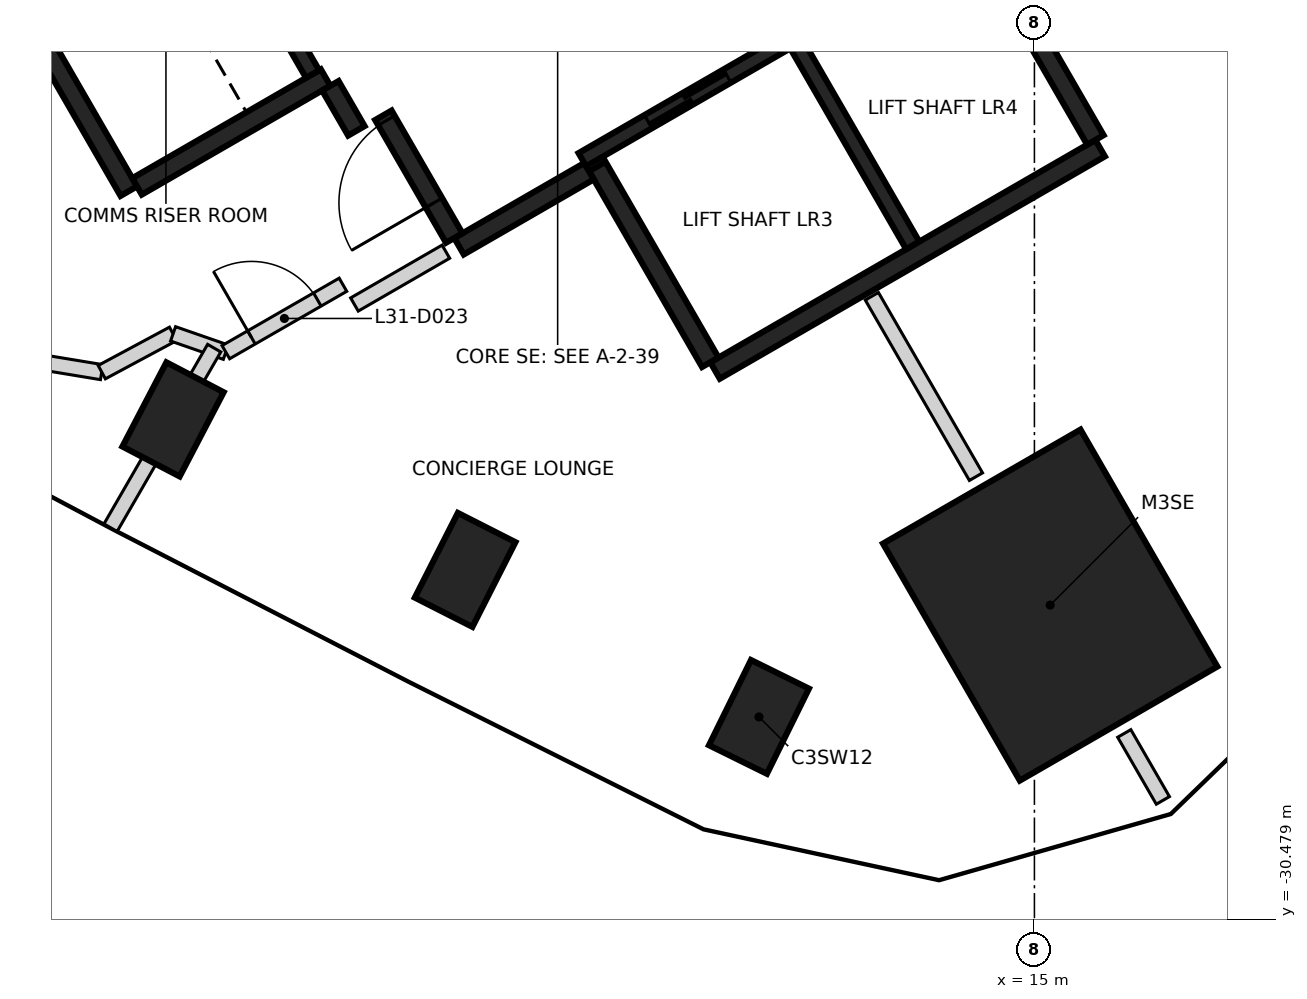
"""IFC4 building model, lengths in metres.
Left out: names, types, materials, properties, quantities, classifications, styles, units other than length and angle.
Written with IfcOpenShell. Run it as: python <this file> out.ifc"""

import sys

from ifc_helpers import new_model, si_unit, direction, frame, frame_2d, origin, origin_2d, place, context, subcontext, project, spatial, rectangle, extrude, element, fill, save


model = new_model("IFC4")
c1 = context("Model", 3, precision=1e-05, world=origin(), true_north=direction((0.0, 1.0)))
c2 = subcontext(c1, "Body", "Model", "MODEL_VIEW")
j1 = project(units=[si_unit("LENGTHUNIT", "METRE"), si_unit("PLANEANGLEUNIT", "RADIAN")], contexts=[c1])
p1 = place(None, origin())
s1 = spatial("IfcSite", under=j1, at=p1, CompositionType="ELEMENT")
p2 = place(p1, origin())
s2 = spatial("IfcBuilding", under=s1, at=p2, CompositionType="ELEMENT")
p3 = place(p2, frame((0.0, 0.0, 128.8)))
s3 = spatial("IfcBuildingStorey", under=s2, at=p3, CompositionType="ELEMENT", Elevation=128.8)
for number, where, z_axis, x_axis in (
    (1, (3.667, -23.896, -0.4), (0.0, 0.0, 1.0), (0.463, 0.886, 0.0)),
    (2, (7.51, -25.876, -0.4), (0.0, 0.0, 1.0), (0.453, 0.892, 0.0)),
    (3, (11.376, -27.811, -0.4), (0.0, 0.0, 1.0), (0.442, 0.897, 0.0)),
):
    element("IfcColumn", number, at=place(p3, frame(where, z_axis=z_axis, x_axis=x_axis)), inside=s3, PredefinedType="COLUMN", context=c2, shape_type="SweptSolid", body=[
        extrude(rectangle(XDim=1.25, YDim=0.85, at=origin_2d()), origin(), (0.0, 0.0, 1.0), 3.6),
    ])
p4 = place(p3, frame((15.207, -26.34, -0.4), z_axis=(0.0, 0.0, 1.0), x_axis=(-0.5, 0.866025403784, 0.0)))
e4 = element("IfcColumn", 4, at=p4, inside=s3, PredefinedType="COLUMN", context=c2, shape_type="SweptSolid", body=[
    extrude(rectangle(XDim=3.6, YDim=3.0, at=origin_2d()), origin(), (0.0, 0.0, 1.0), 3.6),
])
p5 = place(p3, frame((15.865, -20.328, 0.0), z_axis=(0.0, 0.0, 1.0), x_axis=(-0.86602852612, -0.499994591916, 0.0)))
e5 = element("IfcWall", 5, at=p5, inside=s3, PredefinedType="SHEAR", context=c2, shape_type="SweptSolid", body=[
    extrude(rectangle(XDim=5.85, YDim=0.25, at=frame_2d((2.925, 0.0))), origin(), (0.0, 0.0, 1.0), 3.2),
])
for number, where, z_axis, x_axis in (
    (6, (14.315, -17.644, 0.0), (0.0, 0.0, 1.0), (0.5, -0.866, 0.0)),
    (7, (10.736, -23.145, 0.0), (0.0, 0.0, 1.0), (-0.5, 0.866, 0.0)),
):
    element("IfcWall", number, at=place(p3, frame(where, z_axis=z_axis, x_axis=x_axis)), inside=s3, PredefinedType="SHEAR", context=c2, shape_type="SweptSolid", body=[
        extrude(rectangle(XDim=2.974, YDim=0.25, at=frame_2d((1.487, 0.0))), origin(), (0.0, 0.0, 1.0), 3.2),
    ])
p6 = place(p3, frame((3.085, -20.894, 0.0), z_axis=(0.0, 0.0, 1.0), x_axis=(-0.499978833458, 0.866037623948, 0.0)))
e8 = element("IfcWall", 8, at=p6, inside=s3, PredefinedType="SHEAR", context=c2, shape_type="SweptSolid", body=[
    extrude(rectangle(XDim=3.05, YDim=0.25, at=frame_2d((1.525, 0.0))), origin(), (0.0, 0.0, 1.0), 3.2),
])
p7 = place(p3, frame((5.675, -19.399, 0.0), z_axis=(0.0, 0.0, 1.0), x_axis=(-0.866026637627, -0.499997862916, 0.0)))
e9 = element("IfcWall", 9, at=p7, inside=s3, PredefinedType="SHEAR", context=c2, shape_type="SweptSolid", body=[
    extrude(rectangle(XDim=2.865, YDim=0.25, at=frame_2d((1.432, 0.0))), origin(), (0.0, 0.0, 1.0), 3.2),
])
p8 = place(p3, frame((9.14, -20.631, 0.0), z_axis=(0.0, 0.0, 1.0), x_axis=(-0.866043531843, -0.499968599967, 0.0)))
e10 = element("IfcWall", 10, at=p8, inside=s3, PredefinedType="SHEAR", context=c2, shape_type="SweptSolid", body=[
    extrude(rectangle(XDim=1.975, YDim=0.25, at=frame_2d((0.987, 0.0))), origin(), (0.0, 0.0, 1.0), 3.2),
])
p9 = place(p3, frame((7.367, -21.51, 0.0), z_axis=(0.0, 0.0, 1.0), x_axis=(-0.499983108224, 0.866035156036, 0.0)))
e11 = element("IfcWall", 11, at=p9, inside=s3, PredefinedType="SHEAR", context=c2, shape_type="SweptSolid", body=[
    extrude(rectangle(XDim=1.865, YDim=0.25, at=frame_2d((0.932, 0.0))), origin(), (0.0, 0.0, 1.0), 3.2),
])
p10 = place(p9, frame((0.535, 0.0, 0.0)))
e12 = element("IfcOpeningElement", 12, at=p10, cuts=e11, PredefinedType="OPENING", context=c2, shape_type="SweptSolid", body=[
    extrude(rectangle(XDim=1.25, YDim=2.1, at=frame_2d((0.625, 1.05))), frame((0.0, 0.135, 0.0), z_axis=(0.0, -1.0, 0.0), x_axis=(1.0, 0.0, 0.0)), (0.0, 0.0, 1.0), 0.27),
])
p11 = place(p3, frame((6.08, -20.1, 0.0), z_axis=(0.0, 0.0, 1.0), x_axis=(-0.500051773299, 0.865995510393, 0.0)))
e13 = element("IfcWall", 13, at=p11, inside=s3, PredefinedType="SHEAR", context=c2, shape_type="SweptSolid", body=[
    extrude(rectangle(XDim=0.685, YDim=0.25, at=frame_2d((0.342, 0.0))), origin(), (0.0, 0.0, 1.0), 3.2),
])
p12 = place(p3, frame((9.052, -20.48, 0.0), z_axis=(0.0, 0.0, 1.0), x_axis=(0.866030299012, 0.499991521122, 0.0)))
e14 = element("IfcWall", 14, at=p12, inside=s3, PredefinedType="SHEAR", context=c2, shape_type="SweptSolid", body=[
    extrude(rectangle(XDim=6.1, YDim=0.2, at=frame_2d((3.05, 0.0))), origin(), (0.0, 0.0, 1.0), 3.2),
])
p13 = place(p12, frame((1.0, 0.0, 0.0)))
e15 = element("IfcOpeningElement", 15, at=p13, cuts=e14, PredefinedType="OPENING", context=c2, shape_type="SweptSolid", body=[
    extrude(rectangle(XDim=1.2, YDim=2.1, at=frame_2d((0.6, 1.05))), frame((0.0, 0.11, 0.0), z_axis=(0.0, -1.0, 0.0), x_axis=(1.0, 0.0, 0.0)), (0.0, 0.0, 1.0), 0.22),
])
p14 = place(p12, frame((4.05, 0.0, 0.0)))
e16 = element("IfcOpeningElement", 16, at=p14, cuts=e14, PredefinedType="OPENING", context=c2, shape_type="SweptSolid", body=[
    extrude(rectangle(XDim=1.2, YDim=2.1, at=frame_2d((0.6, 1.05))), frame((0.0, 0.11, 0.0), z_axis=(0.0, -1.0, 0.0), x_axis=(1.0, 0.0, 0.0)), (0.0, 0.0, 1.0), 0.22),
])
p15 = place(p3, frame((11.875, -18.967, 0.0), z_axis=(0.0, 0.0, 1.0), x_axis=(0.49998131003, -0.866036194175, 0.0)))
e17 = element("IfcWall", 17, at=p15, inside=s3, PredefinedType="SHEAR", context=c2, shape_type="SweptSolid", body=[
    extrude(rectangle(XDim=3.048, YDim=0.2, at=frame_2d((1.524, 0.0))), origin(), (0.0, 0.0, 1.0), 3.2),
])
p16 = place(p3, frame((5.503, -19.352, 0.0), z_axis=(0.0, 0.0, 1.0), x_axis=(-0.499986818241, 0.866033014143, 0.0)))
e18 = element("IfcWall", 18, at=p16, inside=s3, PredefinedType="SHEAR", context=c2, shape_type="SweptSolid", body=[
    extrude(rectangle(XDim=2.798, YDim=0.2, at=frame_2d((1.399, 0.0))), origin(), (0.0, 0.0, 1.0), 3.2),
])
p17 = place(p16, frame((0.949, 0.0, 0.0)))
e19 = element("IfcOpeningElement", 19, at=p17, cuts=e18, PredefinedType="OPENING", context=c2, shape_type="SweptSolid", body=[
    extrude(rectangle(XDim=0.9, YDim=2.1, at=frame_2d((0.45, 1.05))), frame((0.0, 0.11, 0.0), z_axis=(0.0, -1.0, 0.0), x_axis=(1.0, 0.0, 0.0)), (0.0, 0.0, 1.0), 0.22),
])
p18 = place(p3, frame((1.584, -23.086, 0.0), z_axis=(0.0, 0.0, 1.0), x_axis=(0.986654221629, -0.162829502674, 0.0)))
e20 = element("IfcWall", 20, at=p18, inside=s3, PredefinedType="PARTITIONING", context=c2, shape_type="SweptSolid", body=[
    extrude(rectangle(XDim=1.16, YDim=0.2, at=frame_2d((0.58, 0.0))), origin(), (0.0, 0.0, 1.0), 2.3),
])
p19 = place(p3, frame((2.73, -23.275, 0.0), z_axis=(0.0, 0.0, 1.0), x_axis=(0.880927165636, 0.473251866182, 0.0)))
e21 = element("IfcWall", 21, at=p19, inside=s3, PredefinedType="PARTITIONING", context=c2, shape_type="SweptSolid", body=[
    extrude(rectangle(XDim=1.065, YDim=0.2, at=frame_2d((0.532, 0.0))), origin(), (0.0, 0.0, 1.0), 3.2),
])
p20 = place(p3, frame((3.668, -22.771, 0.0), z_axis=(0.0, 0.0, 1.0), x_axis=(0.944447470761, -0.328662402738, 0.0)))
e22 = element("IfcWall", 22, at=p20, inside=s3, PredefinedType="PARTITIONING", context=c2, shape_type="SweptSolid", body=[
    extrude(rectangle(XDim=0.735, YDim=0.2, at=frame_2d((0.367, 0.0))), origin(), (0.0, 0.0, 1.0), 3.2),
])
p21 = place(p3, frame((4.362, -23.012, 0.0), z_axis=(0.0, 0.0, 1.0), x_axis=(0.866692617793, 0.49884256661, 0.0)))
e23 = element("IfcWall", 23, at=p21, inside=s3, PredefinedType="PARTITIONING", context=c2, shape_type="SweptSolid", body=[
    extrude(rectangle(XDim=1.778, YDim=0.2, at=frame_2d((0.889, 0.0))), origin(), (0.0, 0.0, 1.0), 3.2),
])
p22 = place(p21, frame((0.389, 0.0, 0.0)))
e24 = element("IfcOpeningElement", 24, at=p22, cuts=e23, PredefinedType="OPENING", context=c2, shape_type="SweptSolid", body=[
    extrude(rectangle(XDim=1.0, YDim=2.1, at=frame_2d((0.5, 1.05))), frame((0.0, 0.11, 0.0), z_axis=(0.0, -1.0, 0.0), x_axis=(1.0, 0.0, 0.0)), (0.0, 0.0, 1.0), 0.22),
])
p23 = place(p3, frame((6.054, -22.385, 0.0), z_axis=(0.0, 0.0, 1.0), x_axis=(0.86593101922, 0.500163443238, 0.0)))
e25 = element("IfcWall", 25, at=p23, inside=s3, PredefinedType="PARTITIONING", context=c2, shape_type="SweptSolid", body=[
    extrude(rectangle(XDim=1.39, YDim=0.2, at=frame_2d((0.695, 0.0))), origin(), (0.0, 0.0, 1.0), 3.2),
])
p24 = place(p3, frame((2.845, -25.321, 0.0), z_axis=(0.0, 0.0, 1.0), x_axis=(0.499942002849, 0.866058885866, 0.0)))
e26 = element("IfcWall", 26, at=p24, inside=s3, PredefinedType="PARTITIONING", context=c2, shape_type="SweptSolid", body=[
    extrude(rectangle(XDim=2.727, YDim=0.2, at=frame_2d((1.364, 0.0))), origin(), (0.0, 0.0, 1.0), 3.2),
])
p25 = place(p3, frame((12.861, -22.276, 0.0), z_axis=(0.0, 0.0, 1.0), x_axis=(0.49982784299, -0.866124775868, 0.0)))
e27 = element("IfcWall", 27, at=p25, inside=s3, PredefinedType="PARTITIONING", context=c2, shape_type="SweptSolid", body=[
    extrude(rectangle(XDim=2.741, YDim=0.2, at=frame_2d((1.37, 0.0))), origin(), (0.0, 0.0, 1.0), 3.2),
])
p26 = place(p3, frame((16.182, -28.028, 0.0), z_axis=(0.0, 0.0, 1.0), x_axis=(0.499625455419, -0.866241539236, 0.0)))
e28 = element("IfcWall", 28, at=p26, inside=s3, PredefinedType="PARTITIONING", context=c2, shape_type="SweptSolid", body=[
    extrude(rectangle(XDim=1.017, YDim=0.2, at=frame_2d((0.508, 0.0))), origin(), (0.0, 0.0, 1.0), 3.2),
])
p27 = place(p13, origin())
e29 = element("IfcDoor", 29, at=p27, inside=s3, OperationType="DOUBLE_DOOR_SLIDING", PredefinedType="DOOR", context=c2, shape_type="SweptSolid", body=[
    extrude(rectangle(XDim=1.2, YDim=2.1, at=frame_2d((0.6, 1.05))), frame((0.0, 0.025, 0.0), z_axis=(0.0, -1.0, 0.0), x_axis=(1.0, 0.0, 0.0)), (0.0, 0.0, 1.0), 0.05),
])
fill(e15, e29)
p28 = place(p10, origin())
e30 = element("IfcDoor", 30, at=p28, inside=s3, OperationType="SINGLE_SWING_LEFT", PredefinedType="DOOR", context=c2, shape_type="SweptSolid", body=[
    extrude(rectangle(XDim=1.25, YDim=2.1, at=frame_2d((0.625, 1.05))), frame((0.0, 0.025, 0.0), z_axis=(0.0, -1.0, 0.0), x_axis=(1.0, 0.0, 0.0)), (0.0, 0.0, 1.0), 0.05),
])
fill(e12, e30)
p29 = place(p22, frame((1.0, 0.0, 0.0), z_axis=(0.0, 0.0, 1.0), x_axis=(-1.0, 0.0, 0.0)))
e31 = element("IfcDoor", 31, at=p29, inside=s3, OperationType="SINGLE_SWING_LEFT", PredefinedType="DOOR", context=c2, shape_type="SweptSolid", body=[
    extrude(rectangle(XDim=1.0, YDim=2.1, at=frame_2d((0.5, 1.05))), frame((0.0, 0.025, 0.0), z_axis=(0.0, -1.0, 0.0), x_axis=(1.0, 0.0, 0.0)), (0.0, 0.0, 1.0), 0.05),
])
fill(e24, e31)
save(model, sys.argv[1])
